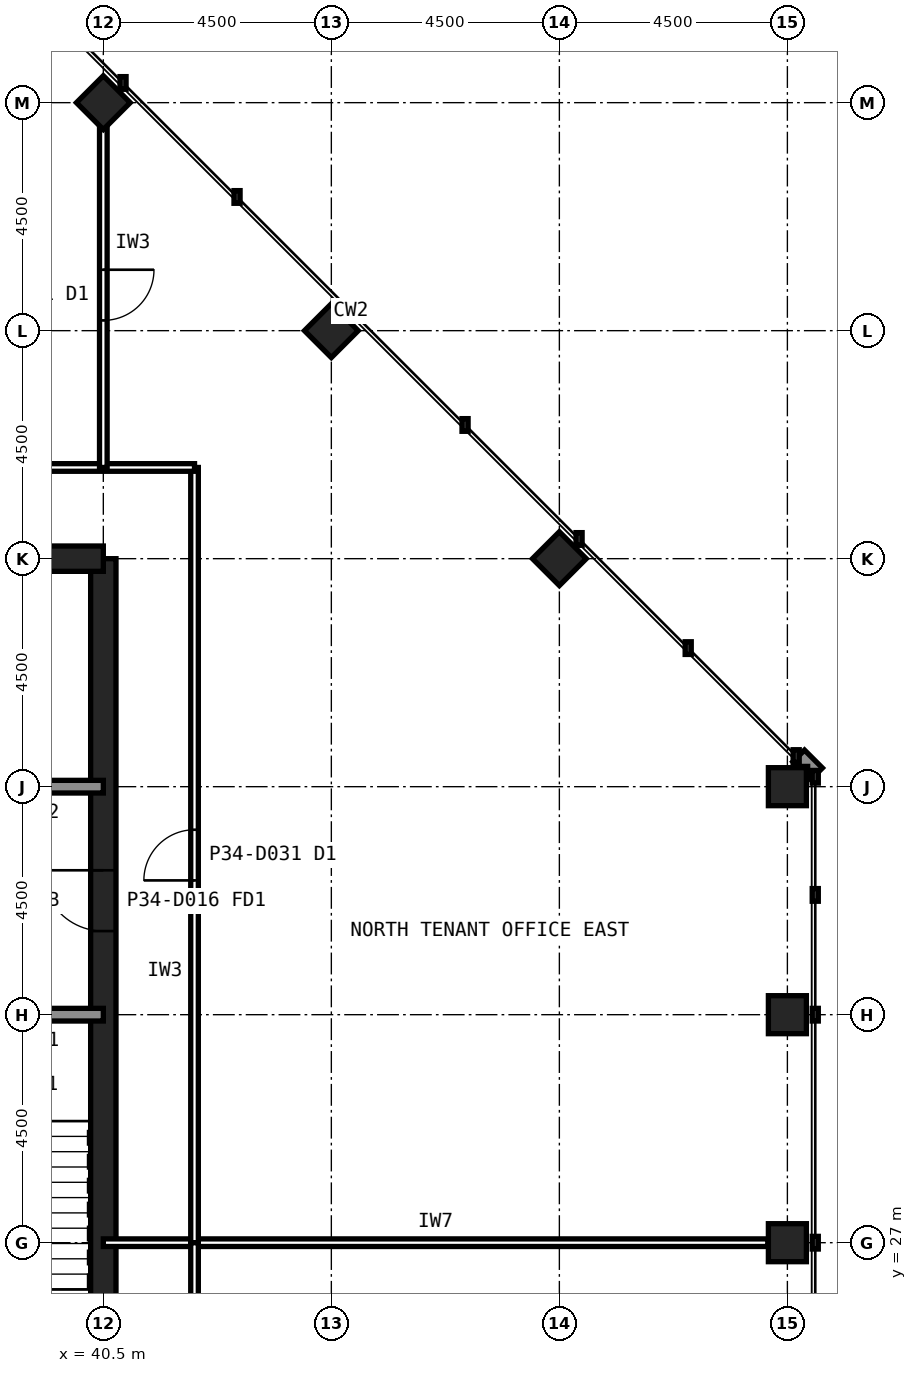
"""IFC4 building model, lengths in metres.
Left out: names, types, materials, properties, quantities, classifications, styles, units other than length and angle.
Written with IfcOpenShell. Run it as: python <this file> out.ifc"""

import sys

from ifc_helpers import new_model, si_unit, direction, frame, frame_2d, origin, origin_2d, place, context, subcontext, project, spatial, rectangle, hollow_rectangle, extrude, element, fill, save


model = new_model("IFC4")
c1 = context("Model", 3, precision=1e-05, world=origin(), true_north=direction((0.0, 1.0)))
c2 = subcontext(c1, "Body", "Model", "MODEL_VIEW")
j1 = project(units=[si_unit("LENGTHUNIT", "METRE"), si_unit("PLANEANGLEUNIT", "RADIAN")], contexts=[c1])
p1 = place(None, origin())
s1 = spatial("IfcSite", under=j1, at=p1, CompositionType="ELEMENT")
p2 = place(p1, origin())
s2 = spatial("IfcBuilding", under=s1, at=p2, CompositionType="ELEMENT")
p3 = place(p2, frame((0.0, 0.0, 143.6)))
s3 = spatial("IfcBuildingStorey", under=s2, at=p3, CompositionType="ELEMENT", Elevation=143.6)
for number, where, z_axis, x_axis in (
    (1, (54.0, 27.0, 0.0), (0.0, 0.0, 1.0), (1.0, 0.0, 0.0)),
    (2, (54.0, 31.5, 0.0), (0.0, 0.0, 1.0), (1.0, 0.0, 0.0)),
    (3, (54.0, 36.0, 0.0), (0.0, 0.0, 1.0), (1.0, 0.0, 0.0)),
    (4, (49.5, 40.5, 0.0), (0.0, 0.0, 1.0), (0.707, 0.707, 0.0)),
    (5, (45.0, 45.0, 0.0), (0.0, 0.0, 1.0), (0.707, 0.707, 0.0)),
    (6, (40.5, 49.5, 0.0), (0.0, 0.0, 1.0), (0.707, 0.707, 0.0)),
):
    element("IfcColumn", number, at=place(p3, frame(where, z_axis=z_axis, x_axis=x_axis)), inside=s3, PredefinedType="COLUMN", context=c2, shape_type="SweptSolid", body=[
        extrude(hollow_rectangle(XDim=0.75, YDim=0.75, WallThickness=0.04, at=origin_2d()), origin(), (0.0, 0.0, 1.0), 4.0),
    ])
p4 = place(p3, frame((40.5, 13.5, 0.0), z_axis=(0.0, 0.0, 1.0), x_axis=(0.0, 1.0, 0.0)))
e7 = element("IfcWall", 7, at=p4, inside=s3, PredefinedType="SHEAR", context=c2, shape_type="SweptSolid", body=[
    extrude(rectangle(XDim=27.0, YDim=0.5, at=frame_2d((13.5, 0.0))), origin(), (0.0, 0.0, 1.0), 4.0),
])
p5 = place(p4, frame((5.85, 0.0, 0.0)))
e8 = element("IfcOpeningElement", 8, at=p5, cuts=e7, PredefinedType="OPENING", context=c2, shape_type="SweptSolid", body=[
    extrude(rectangle(XDim=1.8, YDim=2.1, at=frame_2d((0.9, 1.05))), frame((0.0, 0.26, 0.0), z_axis=(0.0, -1.0, 0.0), x_axis=(1.0, 0.0, 0.0)), (0.0, 0.0, 1.0), 0.52),
])
p6 = place(p4, frame((19.65, 0.0, 0.0)))
e9 = element("IfcOpeningElement", 9, at=p6, cuts=e7, PredefinedType="OPENING", context=c2, shape_type="SweptSolid", body=[
    extrude(rectangle(XDim=1.2, YDim=2.1, at=frame_2d((0.6, 1.05))), frame((0.0, 0.26, 0.0), z_axis=(0.0, -1.0, 0.0), x_axis=(1.0, 0.0, 0.0)), (0.0, 0.0, 1.0), 0.52),
])
p7 = place(p3, frame((40.5, 40.5, 0.0), z_axis=(0.0, 0.0, 1.0), x_axis=(-1.0, 0.0, 0.0)))
e10 = element("IfcWall", 10, at=p7, inside=s3, PredefinedType="SHEAR", context=c2, shape_type="SweptSolid", body=[
    extrude(rectangle(XDim=27.0, YDim=0.5, at=frame_2d((13.5, 0.0))), origin(), (0.0, 0.0, 1.0), 4.0),
])
p8 = place(p3, frame((13.5, 36.0, 0.0), z_axis=(0.0, 0.0, 1.0), x_axis=(1.0, 0.0, 0.0)))
e11 = element("IfcWall", 11, at=p8, inside=s3, PredefinedType="SOLIDWALL", context=c2, shape_type="SweptSolid", body=[
    extrude(rectangle(XDim=27.0, YDim=0.25, at=frame_2d((13.5, 0.0))), origin(), (0.0, 0.0, 1.0), 3.84),
])
p9 = place(p8, frame((1.8, 0.0, 0.0)))
e12 = element("IfcOpeningElement", 12, at=p9, cuts=e11, PredefinedType="OPENING", context=c2, shape_type="SweptSolid", body=[
    extrude(rectangle(XDim=0.9, YDim=2.1, at=frame_2d((0.45, 1.05))), frame((0.0, 0.135, 0.0), z_axis=(0.0, -1.0, 0.0), x_axis=(1.0, 0.0, 0.0)), (0.0, 0.0, 1.0), 0.27),
])
p10 = place(p8, frame((5.55, 0.0, 0.0)))
e13 = element("IfcOpeningElement", 13, at=p10, cuts=e11, PredefinedType="OPENING", context=c2, shape_type="SweptSolid", body=[
    extrude(rectangle(XDim=0.9, YDim=2.1, at=frame_2d((0.45, 1.05))), frame((0.0, 0.135, 0.0), z_axis=(0.0, -1.0, 0.0), x_axis=(1.0, 0.0, 0.0)), (0.0, 0.0, 1.0), 0.27),
])
p11 = place(p8, frame((8.55, 0.0, 0.0)))
e14 = element("IfcOpeningElement", 14, at=p11, cuts=e11, PredefinedType="OPENING", context=c2, shape_type="SweptSolid", body=[
    extrude(rectangle(XDim=0.9, YDim=2.1, at=frame_2d((0.45, 1.05))), frame((0.0, 0.135, 0.0), z_axis=(0.0, -1.0, 0.0), x_axis=(1.0, 0.0, 0.0)), (0.0, 0.0, 1.0), 0.27),
])
p12 = place(p8, frame((11.55, 0.0, 0.0)))
e15 = element("IfcOpeningElement", 15, at=p12, cuts=e11, PredefinedType="OPENING", context=c2, shape_type="SweptSolid", body=[
    extrude(rectangle(XDim=0.9, YDim=2.1, at=frame_2d((0.45, 1.05))), frame((0.0, 0.135, 0.0), z_axis=(0.0, -1.0, 0.0), x_axis=(1.0, 0.0, 0.0)), (0.0, 0.0, 1.0), 0.27),
])
p13 = place(p8, frame((24.1, 0.0, 0.0)))
e16 = element("IfcOpeningElement", 16, at=p13, cuts=e11, PredefinedType="OPENING", context=c2, shape_type="SweptSolid", body=[
    extrude(rectangle(XDim=1.3, YDim=2.2, at=frame_2d((0.65, 1.1))), frame((0.0, 0.135, 0.0), z_axis=(0.0, -1.0, 0.0), x_axis=(1.0, 0.0, 0.0)), (0.0, 0.0, 1.0), 0.27),
])
p14 = place(p3, frame((13.5, 31.5, 0.0), z_axis=(0.0, 0.0, 1.0), x_axis=(1.0, 0.0, 0.0)))
e17 = element("IfcWall", 17, at=p14, inside=s3, PredefinedType="SOLIDWALL", context=c2, shape_type="SweptSolid", body=[
    extrude(rectangle(XDim=27.0, YDim=0.25, at=frame_2d((13.5, 0.0))), origin(), (0.0, 0.0, 1.0), 3.84),
])
p15 = place(p14, frame((24.15, 0.0, 0.0)))
e18 = element("IfcOpeningElement", 18, at=p15, cuts=e17, PredefinedType="OPENING", context=c2, shape_type="SweptSolid", body=[
    extrude(rectangle(XDim=1.2, YDim=2.1, at=frame_2d((0.6, 1.05))), frame((0.0, 0.135, 0.0), z_axis=(0.0, -1.0, 0.0), x_axis=(1.0, 0.0, 0.0)), (0.0, 0.0, 1.0), 0.27),
])
p16 = place(p14, frame((15.3, 0.0, 0.0)))
e19 = element("IfcOpeningElement", 19, at=p16, cuts=e17, PredefinedType="OPENING", context=c2, shape_type="SweptSolid", body=[
    extrude(rectangle(XDim=0.9, YDim=2.1, at=frame_2d((0.45, 1.05))), frame((0.0, 0.135, 0.0), z_axis=(0.0, -1.0, 0.0), x_axis=(1.0, 0.0, 0.0)), (0.0, 0.0, 1.0), 0.27),
])
p17 = place(p14, frame((19.8, 0.0, 0.0)))
e20 = element("IfcOpeningElement", 20, at=p17, cuts=e17, PredefinedType="OPENING", context=c2, shape_type="SweptSolid", body=[
    extrude(rectangle(XDim=0.9, YDim=2.1, at=frame_2d((0.45, 1.05))), frame((0.0, 0.135, 0.0), z_axis=(0.0, -1.0, 0.0), x_axis=(1.0, 0.0, 0.0)), (0.0, 0.0, 1.0), 0.27),
])
p18 = place(p3, frame((40.5, 27.0, 0.0), z_axis=(0.0, 0.0, 1.0), x_axis=(1.0, 0.0, 0.0)))
e21 = element("IfcWall", 21, at=p18, inside=s3, PredefinedType="PARTITIONING", context=c2, shape_type="SweptSolid", body=[
    extrude(rectangle(XDim=13.115, YDim=0.15, at=frame_2d((6.558, 0.0))), origin(), (0.0, 0.0, 1.0), 2.989),
])
p19 = place(p3, frame((42.3, 27.0, 0.0), z_axis=(0.0, 0.0, 1.0), x_axis=(0.0, 1.0, 0.0)))
e22 = element("IfcWall", 22, at=p19, inside=s3, PredefinedType="PARTITIONING", context=c2, shape_type="SweptSolid", body=[
    extrude(rectangle(XDim=15.3, YDim=0.15, at=frame_2d((7.65, 0.0))), origin(), (0.0, 0.0, 1.0), 3.84),
])
p20 = place(p19, frame((7.15, 0.0, 0.0)))
e23 = element("IfcOpeningElement", 23, at=p20, cuts=e22, PredefinedType="OPENING", context=c2, shape_type="SweptSolid", body=[
    extrude(rectangle(XDim=1.0, YDim=2.1, at=frame_2d((0.5, 1.05))), frame((0.0, 0.085, 0.0), z_axis=(0.0, -1.0, 0.0), x_axis=(1.0, 0.0, 0.0)), (0.0, 0.0, 1.0), 0.17),
])
p21 = place(p3, frame((42.3, 42.3, 0.0), z_axis=(0.0, 0.0, 1.0), x_axis=(-1.0, 0.0, 0.0)))
e24 = element("IfcWall", 24, at=p21, inside=s3, PredefinedType="PARTITIONING", context=c2, shape_type="SweptSolid", body=[
    extrude(rectangle(XDim=13.5, YDim=0.15, at=frame_2d((6.75, 0.0))), origin(), (0.0, 0.0, 1.0), 3.84),
])
p22 = place(p3, frame((42.3, 11.7, 0.0), z_axis=(0.0, 0.0, 1.0), x_axis=(0.0, 1.0, 0.0)))
e25 = element("IfcWall", 25, at=p22, inside=s3, PredefinedType="PARTITIONING", context=c2, shape_type="SweptSolid", body=[
    extrude(rectangle(XDim=15.3, YDim=0.15, at=frame_2d((7.65, 0.0))), origin(), (0.0, 0.0, 1.0), 3.84),
])
p23 = place(p22, frame((7.15, 0.0, 0.0)))
e26 = element("IfcOpeningElement", 26, at=p23, cuts=e25, PredefinedType="OPENING", context=c2, shape_type="SweptSolid", body=[
    extrude(rectangle(XDim=1.0, YDim=2.1, at=frame_2d((0.5, 1.05))), frame((0.0, 0.085, 0.0), z_axis=(0.0, -1.0, 0.0), x_axis=(1.0, 0.0, 0.0)), (0.0, 0.0, 1.0), 0.17),
])
p24 = place(p3, frame((40.5, 49.105, 0.0), z_axis=(0.0, 0.0, 1.0), x_axis=(0.0, -1.0, 0.0)))
e27 = element("IfcWall", 27, at=p24, inside=s3, PredefinedType="PARTITIONING", context=c2, shape_type="SweptSolid", body=[
    extrude(rectangle(XDim=6.805, YDim=0.15, at=frame_2d((3.402, 0.0))), origin(), (0.0, 0.0, 1.0), 2.989),
])
p25 = place(p24, frame((2.903, 0.0, 0.0)))
e28 = element("IfcOpeningElement", 28, at=p25, cuts=e27, PredefinedType="OPENING", context=c2, shape_type="SweptSolid", body=[
    extrude(rectangle(XDim=1.0, YDim=2.1, at=frame_2d((0.5, 1.05))), frame((0.0, 0.085, 0.0), z_axis=(0.0, -1.0, 0.0), x_axis=(1.0, 0.0, 0.0)), (0.0, 0.0, 1.0), 0.17),
])
p26 = place(p6, origin())
e29 = element("IfcDoor", 29, at=p26, inside=s3, OperationType="SINGLE_SWING_RIGHT", PredefinedType="DOOR", context=c2, shape_type="SweptSolid", body=[
    extrude(rectangle(XDim=1.2, YDim=2.1, at=frame_2d((0.6, 1.05))), frame((0.0, 0.025, 0.0), z_axis=(0.0, -1.0, 0.0), x_axis=(1.0, 0.0, 0.0)), (0.0, 0.0, 1.0), 0.05),
])
fill(e9, e29)
p27 = place(p20, origin())
e30 = element("IfcDoor", 30, at=p27, inside=s3, OperationType="SINGLE_SWING_LEFT", PredefinedType="DOOR", context=c2, shape_type="SweptSolid", body=[
    extrude(rectangle(XDim=1.0, YDim=2.1, at=frame_2d((0.5, 1.05))), frame((0.0, 0.025, 0.0), z_axis=(0.0, -1.0, 0.0), x_axis=(1.0, 0.0, 0.0)), (0.0, 0.0, 1.0), 0.05),
])
fill(e23, e30)
p28 = place(p25, origin())
e31 = element("IfcDoor", 31, at=p28, inside=s3, OperationType="SINGLE_SWING_LEFT", PredefinedType="DOOR", context=c2, shape_type="SweptSolid", body=[
    extrude(rectangle(XDim=1.0, YDim=2.1, at=frame_2d((0.5, 1.05))), frame((0.0, 0.025, 0.0), z_axis=(0.0, -1.0, 0.0), x_axis=(1.0, 0.0, 0.0)), (0.0, 0.0, 1.0), 0.05),
])
fill(e28, e31)
save(model, sys.argv[1])
